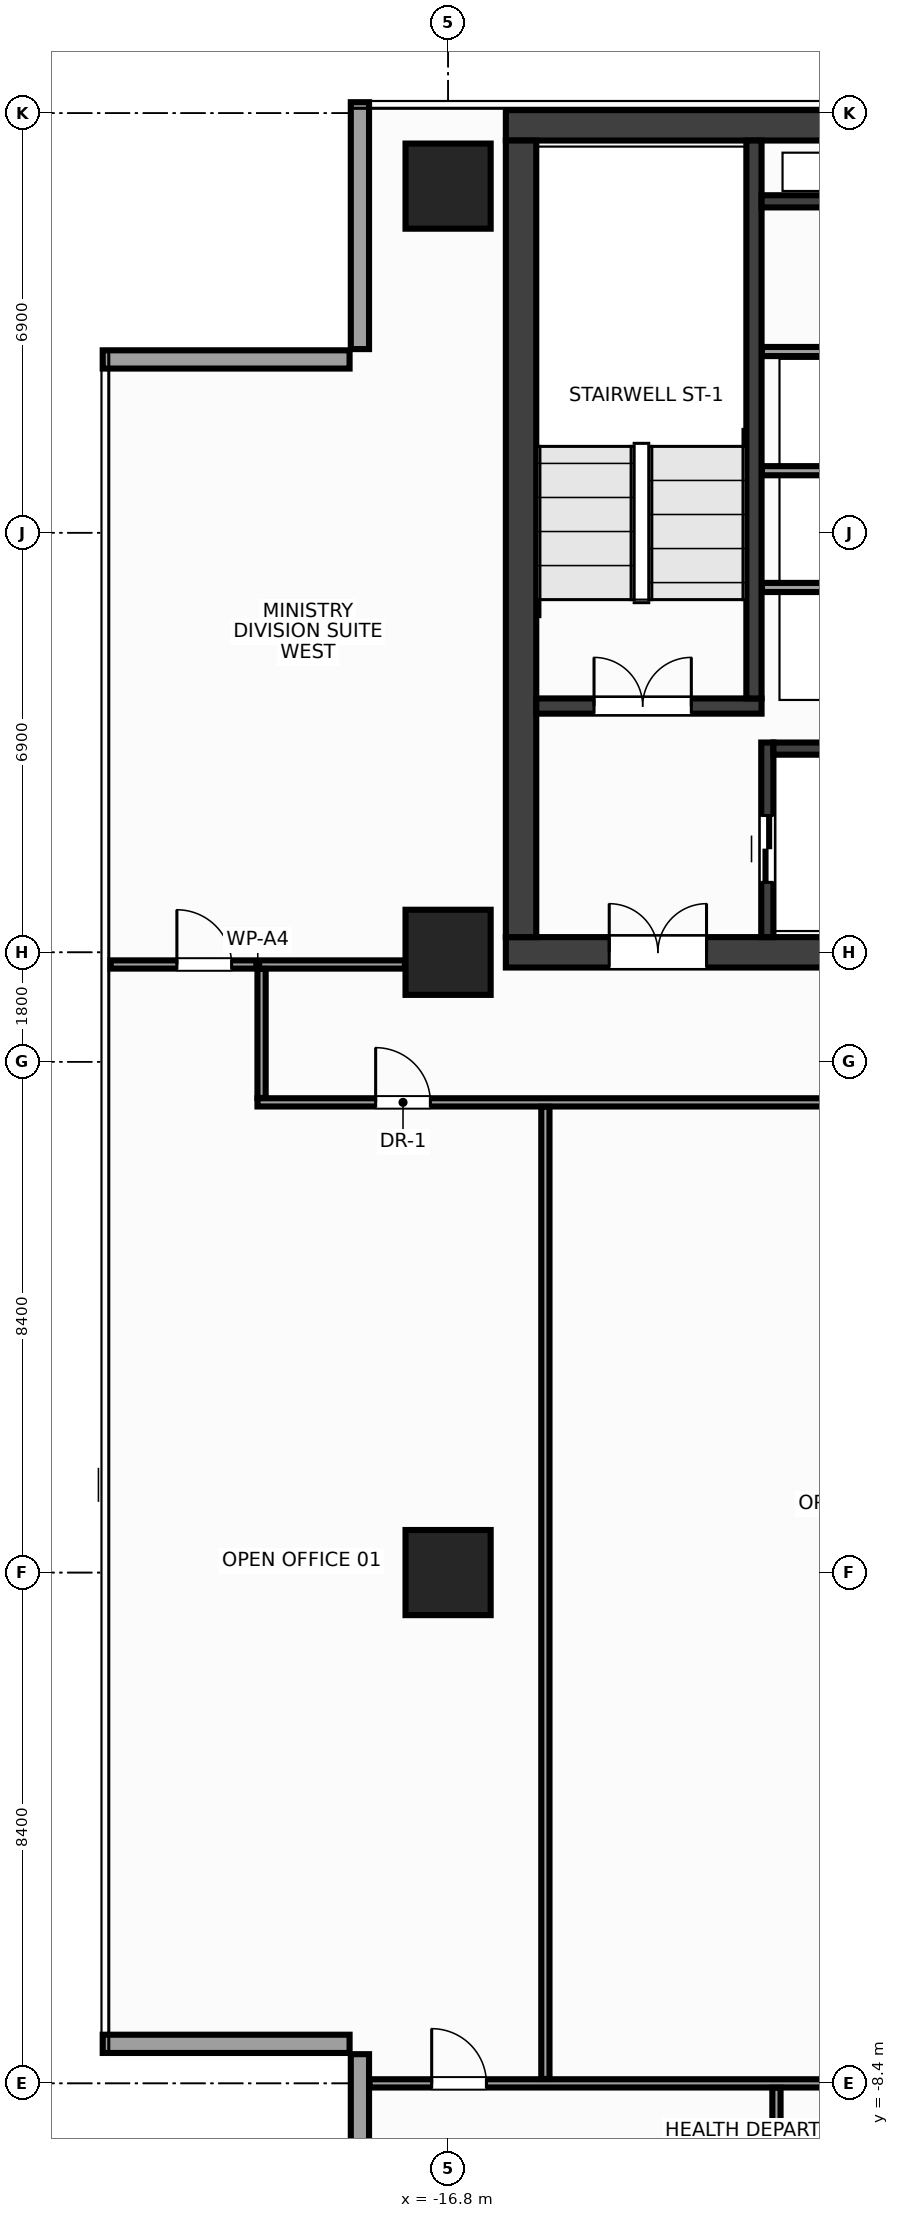
"""IFC4 building model, lengths in metres.
Left out: names, types, materials, properties, quantities, classifications, styles, units other than length and angle.
Written with IfcOpenShell. Run it as: python <this file> out.ifc"""

import sys

from ifc_helpers import new_model, si_unit, direction, frame, frame_2d, origin, origin_2d, place, context, subcontext, project, spatial, rectangle, extrude, source, transform, mapped, element, fill, save


model = new_model("IFC4")
c1 = context("Model", 3, precision=1e-05, world=origin(), true_north=direction((0.0, 1.0)))
c2 = subcontext(c1, "Body", "Model", "MODEL_VIEW")
j1 = project(units=[si_unit("LENGTHUNIT", "METRE"), si_unit("PLANEANGLEUNIT", "RADIAN")], contexts=[c1])
p1 = place(None, origin())
s1 = spatial("IfcSite", under=j1, at=p1, CompositionType="ELEMENT")
p2 = place(p1, origin())
s2 = spatial("IfcBuilding", under=s1, at=p2, CompositionType="ELEMENT")
p3 = place(p2, frame((0.0, 0.0, 232.4)))
s3 = spatial("IfcBuildingStorey", under=s2, at=p3, CompositionType="ELEMENT", Elevation=232.4)
m1 = source(origin(), c2, "Body", "SweptSolid", [
    extrude(rectangle(XDim=31.7, YDim=0.5, at=frame_2d((15.85, 0.0))), origin(), (0.0, 0.0, 1.0), 3.6),
])
p4 = place(p3, frame((-15.85, 23.8, 0.0), z_axis=(0.0, 0.0, 1.0), x_axis=(1.0, 0.0, 0.0)))
e1 = element("IfcWall", 1, at=p4, inside=s3, PredefinedType="SHEAR", context=c2, shape_type="MappedRepresentation", body=[
    mapped(m1, transform((0.0, 0.0, 0.0), x_axis=(1.0, 0.0, 0.0), y_axis=(0.0, 1.0, 0.0), z_axis=(0.0, 0.0, 1.0), scale=1.0)),
])
p5 = place(p3, frame((-15.85, 10.2, 0.0), z_axis=(0.0, 0.0, 1.0), x_axis=(1.0, 0.0, 0.0)))
e2 = element("IfcWall", 2, at=p5, inside=s3, PredefinedType="SHEAR", context=c2, shape_type="MappedRepresentation", body=[
    mapped(m1, transform((0.0, 0.0, 0.0), x_axis=(1.0, 0.0, 0.0), y_axis=(0.0, 1.0, 0.0), z_axis=(0.0, 0.0, 1.0), scale=1.0)),
])
p6 = place(p5, frame((1.7, 0.0, 0.0)))
e3 = element("IfcOpeningElement", 3, at=p6, cuts=e2, PredefinedType="OPENING", context=c2, shape_type="SweptSolid", body=[
    extrude(rectangle(XDim=1.6, YDim=2.15, at=frame_2d((0.8, 1.075))), frame((0.0, 0.262, 0.0), z_axis=(0.0, -1.0, 0.0), x_axis=(1.0, 0.0, 0.0)), (0.0, 0.0, 1.0), 0.524),
])
p7 = place(p5, frame((28.4, 0.0, 0.0)))
e4 = element("IfcOpeningElement", 4, at=p7, cuts=e2, PredefinedType="OPENING", context=c2, shape_type="SweptSolid", body=[
    extrude(rectangle(XDim=1.6, YDim=2.15, at=frame_2d((0.8, 1.075))), frame((0.0, 0.262, 0.0), z_axis=(0.0, -1.0, 0.0), x_axis=(1.0, 0.0, 0.0)), (0.0, 0.0, 1.0), 0.524),
])
p8 = place(p5, frame((15.1, 0.0, 0.0)))
e5 = element("IfcOpeningElement", 5, at=p8, cuts=e2, PredefinedType="OPENING", context=c2, shape_type="SweptSolid", body=[
    extrude(rectangle(XDim=1.5, YDim=2.2, at=frame_2d((0.75, 1.1))), frame((0.0, 0.262, 0.0), z_axis=(0.0, -1.0, 0.0), x_axis=(1.0, 0.0, 0.0)), (0.0, 0.0, 1.0), 0.524),
])
m2 = source(origin(), c2, "Body", "SweptSolid", [
    extrude(rectangle(XDim=13.1, YDim=0.5, at=frame_2d((6.55, 0.0))), origin(), (0.0, 0.0, 1.0), 3.6),
])
p9 = place(p3, frame((-15.6, 10.45, 0.0), z_axis=(0.0, 0.0, 1.0), x_axis=(0.0, 1.0, 0.0)))
e6 = element("IfcWall", 6, at=p9, inside=s3, PredefinedType="SHEAR", context=c2, shape_type="MappedRepresentation", body=[
    mapped(m2, transform((0.0, 0.0, 0.0), x_axis=(1.0, 0.0, 0.0), y_axis=(0.0, 1.0, 0.0), z_axis=(0.0, 0.0, 1.0), scale=1.0)),
])
m3 = source(origin(), c2, "Body", "SweptSolid", [
    extrude(rectangle(XDim=3.705, YDim=0.25, at=frame_2d((1.853, 0.0))), origin(), (0.0, 0.0, 1.0), 3.6),
])
p10 = place(p3, frame((-15.35, 14.25, 0.0), z_axis=(0.0, 0.0, 1.0), x_axis=(1.0, 0.0, 0.0)))
e7 = element("IfcWall", 7, at=p10, inside=s3, PredefinedType="SHEAR", context=c2, shape_type="MappedRepresentation", body=[
    mapped(m3, transform((0.0, 0.0, 0.0), x_axis=(1.0, 0.0, 0.0), y_axis=(0.0, 1.0, 0.0), z_axis=(0.0, 0.0, 1.0), scale=1.0)),
])
p11 = place(p10, frame((0.95, 0.0, 0.0)))
e8 = element("IfcOpeningElement", 8, at=p11, cuts=e7, PredefinedType="OPENING", context=c2, shape_type="SweptSolid", body=[
    extrude(rectangle(XDim=1.6, YDim=2.15, at=frame_2d((0.8, 1.075))), frame((0.0, 0.137, 0.0), z_axis=(0.0, -1.0, 0.0), x_axis=(1.0, 0.0, 0.0)), (0.0, 0.0, 1.0), 0.274),
])
m4 = source(origin(), c2, "Body", "SweptSolid", [
    extrude(rectangle(XDim=9.175, YDim=0.25, at=frame_2d((4.587, 0.0))), origin(), (0.0, 0.0, 1.0), 3.6),
])
p12 = place(p3, frame((-11.77, 14.375, 0.0), z_axis=(0.0, 0.0, 1.0), x_axis=(0.0, 1.0, 0.0)))
e9 = element("IfcWall", 9, at=p12, inside=s3, PredefinedType="SHEAR", context=c2, shape_type="MappedRepresentation", body=[
    mapped(m4, transform((0.0, 0.0, 0.0), x_axis=(1.0, 0.0, 0.0), y_axis=(0.0, 1.0, 0.0), z_axis=(0.0, 0.0, 1.0), scale=1.0)),
])
m5 = source(origin(), c2, "Body", "SweptSolid", [
    extrude(rectangle(XDim=3.2, YDim=0.2, at=frame_2d((1.6, 0.0))), origin(), (0.0, 0.0, 1.0), 3.6),
])
p13 = place(p3, frame((-11.55, 10.45, 0.0), z_axis=(0.0, 0.0, 1.0), x_axis=(0.0, 1.0, 0.0)))
e10 = element("IfcWall", 10, at=p13, inside=s3, PredefinedType="SHEAR", context=c2, shape_type="MappedRepresentation", body=[
    mapped(m5, transform((0.0, 0.0, 0.0), x_axis=(1.0, 0.0, 0.0), y_axis=(0.0, 1.0, 0.0), z_axis=(0.0, 0.0, 1.0), scale=1.0)),
])
p14 = place(p13, frame((0.9, 0.0, 0.0)))
e11 = element("IfcOpeningElement", 11, at=p14, cuts=e10, PredefinedType="OPENING", context=c2, shape_type="SweptSolid", body=[
    extrude(rectangle(XDim=1.1, YDim=2.15, at=frame_2d((0.55, 1.075))), frame((0.0, 0.112, 0.0), z_axis=(0.0, -1.0, 0.0), x_axis=(1.0, 0.0, 0.0)), (0.0, 0.0, 1.0), 0.224),
])
m6 = source(origin(), c2, "Body", "SweptSolid", [
    extrude(rectangle(XDim=2.825, YDim=0.2, at=frame_2d((1.413, 0.0))), origin(), (0.0, 0.0, 1.0), 3.6),
])
p15 = place(p3, frame((-11.45, 13.55, 0.0), z_axis=(0.0, 0.0, 1.0), x_axis=(1.0, 0.0, 0.0)))
e12 = element("IfcWall", 12, at=p15, inside=s3, PredefinedType="SHEAR", context=c2, shape_type="MappedRepresentation", body=[
    mapped(m6, transform((0.0, 0.0, 0.0), x_axis=(1.0, 0.0, 0.0), y_axis=(0.0, 1.0, 0.0), z_axis=(0.0, 0.0, 1.0), scale=1.0)),
])
m7 = source(origin(), c2, "Body", "SweptSolid", [
    extrude(rectangle(XDim=3.02, YDim=0.2, at=frame_2d((1.51, 0.0))), origin(), (0.0, 0.0, 1.0), 3.6),
])
p16 = place(p3, frame((-11.645, 22.55, 0.0), z_axis=(0.0, 0.0, 1.0), x_axis=(1.0, 0.0, 0.0)))
e13 = element("IfcWall", 13, at=p16, inside=s3, PredefinedType="SHEAR", context=c2, shape_type="MappedRepresentation", body=[
    mapped(m7, transform((0.0, 0.0, 0.0), x_axis=(1.0, 0.0, 0.0), y_axis=(0.0, 1.0, 0.0), z_axis=(0.0, 0.0, 1.0), scale=1.0)),
])
m8 = source(origin(), c2, "Body", "SweptSolid", [
    extrude(rectangle(XDim=1.4, YDim=1.4, at=origin_2d()), origin(), (0.0, 0.0, 1.0), 3.6),
])
for number, where, z_axis, x_axis in (
    (14, (-16.8, 0.0, 0.0), (0.0, 0.0, 1.0), (1.0, 0.0, 0.0)),
    (15, (-16.8, 10.2, 0.0), (0.0, 0.0, 1.0), (1.0, 0.0, 0.0)),
    (16, (-16.8, 22.8, 0.0), (0.0, 0.0, 1.0), (1.0, 0.0, 0.0)),
):
    element("IfcColumn", number, at=place(p3, frame(where, z_axis=z_axis, x_axis=x_axis)), inside=s3, PredefinedType="COLUMN", context=c2, shape_type="MappedRepresentation", body=[
        mapped(m8, transform((0.0, 0.0, 0.0), x_axis=(1.0, 0.0, 0.0), y_axis=(0.0, 1.0, 0.0), z_axis=(0.0, 0.0, 1.0), scale=1.0)),
    ])
m9 = source(origin(), c2, "Body", "SweptSolid", [
    extrude(rectangle(XDim=4.06, YDim=0.3, at=frame_2d((2.03, 0.0))), origin(), (0.0, 0.0, 1.0), 2.75),
])
p17 = place(p3, frame((-18.25, 24.18, 0.0), z_axis=(0.0, 0.0, 1.0), x_axis=(0.0, -1.0, 0.0)))
e17 = element("IfcWall", 17, at=p17, inside=s3, PredefinedType="STANDARD", context=c2, shape_type="MappedRepresentation", body=[
    mapped(m9, transform((0.0, 0.0, 0.0), x_axis=(1.0, 0.0, 0.0), y_axis=(0.0, 1.0, 0.0), z_axis=(0.0, 0.0, 1.0), scale=1.0)),
])
m10 = source(origin(), c2, "Body", "SweptSolid", [
    extrude(rectangle(XDim=4.06, YDim=0.3, at=frame_2d((2.03, 0.0))), origin(), (0.0, 0.0, 1.0), 2.75),
])
for number, where, z_axis, x_axis in (
    (18, (-18.42, 19.95, 0.0), (0.0, 0.0, 1.0), (-1.0, 0.0, 0.0)),
    (19, (-22.48, -7.75, 0.0), (0.0, 0.0, 1.0), (1.0, 0.0, 0.0)),
    (20, (-18.25, -7.92, 0.0), (0.0, 0.0, 1.0), (0.0, -1.0, 0.0)),
):
    element("IfcWall", number, at=place(p3, frame(where, z_axis=z_axis, x_axis=x_axis)), inside=s3, PredefinedType="STANDARD", context=c2, shape_type="MappedRepresentation", body=[
        mapped(m10, transform((0.0, 0.0, 0.0), x_axis=(1.0, 0.0, 0.0), y_axis=(0.0, 1.0, 0.0), z_axis=(0.0, 0.0, 1.0), scale=1.0)),
    ])
m11 = source(origin(), c2, "Body", "SweptSolid", [
    extrude(rectangle(XDim=3.01, YDim=0.15, at=frame_2d((1.505, 0.0))), origin(), (0.0, 0.0, 1.0), 3.37),
])
for number, where, z_axis, x_axis in (
    (21, (-11.64, 16.2, 0.0), (0.0, 0.0, 1.0), (1.0, 0.0, 0.0)),
    (22, (-11.64, 18.12, 0.0), (0.0, 0.0, 1.0), (1.0, 0.0, 0.0)),
    (23, (-11.64, 20.08, 0.0), (0.0, 0.0, 1.0), (1.0, 0.0, 0.0)),
):
    element("IfcWall", number, at=place(p3, frame(where, z_axis=z_axis, x_axis=x_axis)), inside=s3, PredefinedType="PARTITIONING", context=c2, shape_type="MappedRepresentation", body=[
        mapped(m11, transform((0.0, 0.0, 0.0), x_axis=(1.0, 0.0, 0.0), y_axis=(0.0, 1.0, 0.0), z_axis=(0.0, 0.0, 1.0), scale=1.0)),
    ])
m12 = source(origin(), c2, "Body", "SweptSolid", [
    extrude(rectangle(XDim=4.84, YDim=0.135, at=frame_2d((2.42, 0.0))), origin(), (0.0, 0.0, 1.0), 3.37),
])
p18 = place(p3, frame((-22.35, 10.0, 0.0), z_axis=(0.0, 0.0, 1.0), x_axis=(1.0, 0.0, 0.0)))
e24 = element("IfcWall", 24, at=p18, inside=s3, PredefinedType="PARTITIONING", context=c2, shape_type="MappedRepresentation", body=[
    mapped(m12, transform((0.0, 0.0, 0.0), x_axis=(1.0, 0.0, 0.0), y_axis=(0.0, 1.0, 0.0), z_axis=(0.0, 0.0, 1.0), scale=1.0)),
])
p19 = place(p18, frame((1.09, 0.0, 0.0)))
e25 = element("IfcOpeningElement", 25, at=p19, cuts=e24, PredefinedType="OPENING", context=c2, shape_type="SweptSolid", body=[
    extrude(rectangle(XDim=0.9, YDim=2.15, at=frame_2d((0.45, 1.075))), frame((0.0, 0.08, 0.0), z_axis=(0.0, -1.0, 0.0), x_axis=(1.0, 0.0, 0.0)), (0.0, 0.0, 1.0), 0.159),
])
m13 = source(origin(), c2, "Body", "SweptSolid", [
    extrude(rectangle(XDim=15.6, YDim=0.135, at=frame_2d((7.8, 0.0))), origin(), (0.0, 0.0, 1.0), 2.755),
])
p20 = place(p3, frame((-19.935, 7.732, 0.0), z_axis=(0.0, 0.0, 1.0), x_axis=(1.0, 0.0, 0.0)))
e26 = element("IfcWall", 26, at=p20, inside=s3, PredefinedType="PARTITIONING", context=c2, shape_type="MappedRepresentation", body=[
    mapped(m13, transform((0.0, 0.0, 0.0), x_axis=(1.0, 0.0, 0.0), y_axis=(0.0, 1.0, 0.0), z_axis=(0.0, 0.0, 1.0), scale=1.0)),
])
p21 = place(p20, frame((1.944, 0.0, 0.0)))
e27 = element("IfcOpeningElement", 27, at=p21, cuts=e26, PredefinedType="OPENING", context=c2, shape_type="SweptSolid", body=[
    extrude(rectangle(XDim=0.9, YDim=2.15, at=frame_2d((0.45, 1.075))), frame((0.0, 0.08, 0.0), z_axis=(0.0, -1.0, 0.0), x_axis=(1.0, 0.0, 0.0)), (0.0, 0.0, 1.0), 0.159),
])
p22 = place(p20, frame((9.691, 0.0, 0.0)))
e28 = element("IfcOpeningElement", 28, at=p22, cuts=e26, PredefinedType="OPENING", context=c2, shape_type="SweptSolid", body=[
    extrude(rectangle(XDim=0.9, YDim=2.15, at=frame_2d((0.45, 1.075))), frame((0.0, 0.08, 0.0), z_axis=(0.0, -1.0, 0.0), x_axis=(1.0, 0.0, 0.0)), (0.0, 0.0, 1.0), 0.159),
])
m14 = source(origin(), c2, "Body", "SweptSolid", [
    extrude(rectangle(XDim=2.123, YDim=0.135, at=frame_2d((1.061, 0.0))), origin(), (0.0, 0.0, 1.0), 3.37),
])
p23 = place(p3, frame((-19.867, 7.805, 0.0), z_axis=(0.0, 0.0, 1.0), x_axis=(0.0, 1.0, 0.0)))
e29 = element("IfcWall", 29, at=p23, inside=s3, PredefinedType="PARTITIONING", context=c2, shape_type="MappedRepresentation", body=[
    mapped(m14, transform((0.0, 0.0, 0.0), x_axis=(1.0, 0.0, 0.0), y_axis=(0.0, 1.0, 0.0), z_axis=(0.0, 0.0, 1.0), scale=1.0)),
])
m15 = source(origin(), c2, "Body", "SweptSolid", [
    extrude(rectangle(XDim=36.184, YDim=0.135, at=frame_2d((18.092, 0.0))), origin(), (0.0, 0.0, 1.0), 2.755),
])
p24 = place(p3, frame((-18.092, -8.4, 0.0), z_axis=(0.0, 0.0, 1.0), x_axis=(1.0, 0.0, 0.0)))
e30 = element("IfcWall", 30, at=p24, inside=s3, PredefinedType="PARTITIONING", context=c2, shape_type="MappedRepresentation", body=[
    mapped(m15, transform((0.0, 0.0, 0.0), x_axis=(1.0, 0.0, 0.0), y_axis=(0.0, 1.0, 0.0), z_axis=(0.0, 0.0, 1.0), scale=1.0)),
])
p25 = place(p24, frame((1.022, 0.0, 0.0)))
e31 = element("IfcOpeningElement", 31, at=p25, cuts=e30, PredefinedType="OPENING", context=c2, shape_type="SweptSolid", body=[
    extrude(rectangle(XDim=0.9, YDim=2.15, at=frame_2d((0.45, 1.075))), frame((0.0, 0.08, 0.0), z_axis=(0.0, -1.0, 0.0), x_axis=(1.0, 0.0, 0.0)), (0.0, 0.0, 1.0), 0.159),
])
p26 = place(p24, frame((9.142, 0.0, 0.0)))
e32 = element("IfcOpeningElement", 32, at=p26, cuts=e30, PredefinedType="OPENING", context=c2, shape_type="SweptSolid", body=[
    extrude(rectangle(XDim=0.9, YDim=2.15, at=frame_2d((0.45, 1.075))), frame((0.0, 0.08, 0.0), z_axis=(0.0, -1.0, 0.0), x_axis=(1.0, 0.0, 0.0)), (0.0, 0.0, 1.0), 0.159),
])
p27 = place(p24, frame((33.862, 0.0, 0.0)))
e33 = element("IfcOpeningElement", 33, at=p27, cuts=e30, PredefinedType="OPENING", context=c2, shape_type="SweptSolid", body=[
    extrude(rectangle(XDim=0.9, YDim=2.15, at=frame_2d((0.45, 1.075))), frame((0.0, 0.08, 0.0), z_axis=(0.0, -1.0, 0.0), x_axis=(1.0, 0.0, 0.0)), (0.0, 0.0, 1.0), 0.159),
])
p28 = place(p24, frame((18.942, 0.0, 0.0)))
e34 = element("IfcOpeningElement", 34, at=p28, cuts=e30, PredefinedType="OPENING", context=c2, shape_type="SweptSolid", body=[
    extrude(rectangle(XDim=0.9, YDim=2.15, at=frame_2d((0.45, 1.075))), frame((0.0, 0.08, 0.0), z_axis=(0.0, -1.0, 0.0), x_axis=(1.0, 0.0, 0.0)), (0.0, 0.0, 1.0), 0.159),
])
p29 = place(p24, frame((25.542, 0.0, 0.0)))
e35 = element("IfcOpeningElement", 35, at=p29, cuts=e30, PredefinedType="OPENING", context=c2, shape_type="SweptSolid", body=[
    extrude(rectangle(XDim=0.9, YDim=2.15, at=frame_2d((0.45, 1.075))), frame((0.0, 0.08, 0.0), z_axis=(0.0, -1.0, 0.0), x_axis=(1.0, 0.0, 0.0)), (0.0, 0.0, 1.0), 0.159),
])
m16 = source(origin(), c2, "Body", "SweptSolid", [
    extrude(rectangle(XDim=15.987, YDim=0.135, at=frame_2d((7.994, 0.0))), origin(), (0.0, 0.0, 1.0), 2.655),
])
p30 = place(p3, frame((-15.2, -8.327, 0.0), z_axis=(0.0, 0.0, 1.0), x_axis=(0.0, 1.0, 0.0)))
e36 = element("IfcWall", 36, at=p30, inside=s3, PredefinedType="PARTITIONING", context=c2, shape_type="MappedRepresentation", body=[
    mapped(m16, transform((0.0, 0.0, 0.0), x_axis=(1.0, 0.0, 0.0), y_axis=(0.0, 1.0, 0.0), z_axis=(0.0, 0.0, 1.0), scale=1.0)),
])
m17 = source(origin(), c2, "Body", "SweptSolid", [
    extrude(rectangle(XDim=3.378, YDim=0.135, at=frame_2d((1.689, 0.0))), origin(), (0.0, 0.0, 1.0), 2.905),
])
p31 = place(p3, frame((-11.4, -11.85, 0.0), z_axis=(0.0, 0.0, 1.0), x_axis=(0.0, 1.0, 0.0)))
e37 = element("IfcWall", 37, at=p31, inside=s3, PredefinedType="PARTITIONING", context=c2, shape_type="MappedRepresentation", body=[
    mapped(m17, transform((0.0, 0.0, 0.0), x_axis=(1.0, 0.0, 0.0), y_axis=(0.0, 1.0, 0.0), z_axis=(0.0, 0.0, 1.0), scale=1.0)),
])
m18 = source(origin(), c2, "Body", "SweptSolid", [
    extrude(rectangle(XDim=1.6, YDim=2.15, at=frame_2d((0.8, 1.075))), frame((0.0, 0.025, 0.0), z_axis=(0.0, -1.0, 0.0), x_axis=(1.0, 0.0, 0.0)), (0.0, 0.0, 1.0), 0.05),
])
p32 = place(p11, origin())
e38 = element("IfcDoor", 38, at=p32, inside=s3, OperationType="DOUBLE_DOOR_SINGLE_SWING", PredefinedType="DOOR", context=c2, shape_type="MappedRepresentation", body=[
    mapped(m18, transform((0.0, 0.0, 0.0), x_axis=(1.0, 0.0, 0.0), y_axis=(0.0, 1.0, 0.0), z_axis=(0.0, 0.0, 1.0), scale=1.0)),
])
fill(e8, e38)
p33 = place(p6, origin())
e39 = element("IfcDoor", 39, at=p33, inside=s3, OperationType="DOUBLE_DOOR_SINGLE_SWING", PredefinedType="DOOR", context=c2, shape_type="MappedRepresentation", body=[
    mapped(m18, transform((0.0, 0.0, 0.0), x_axis=(1.0, 0.0, 0.0), y_axis=(0.0, 1.0, 0.0), z_axis=(0.0, 0.0, 1.0), scale=1.0)),
])
fill(e3, e39)
m19 = source(origin(), c2, "Body", "SweptSolid", [
    extrude(rectangle(XDim=1.1, YDim=2.15, at=frame_2d((0.55, 1.075))), frame((0.0, 0.025, 0.0), z_axis=(0.0, -1.0, 0.0), x_axis=(1.0, 0.0, 0.0)), (0.0, 0.0, 1.0), 0.05),
])
p34 = place(p14, origin())
e40 = element("IfcDoor", 40, at=p34, inside=s3, OperationType="DOUBLE_DOOR_SLIDING", PredefinedType="DOOR", context=c2, shape_type="MappedRepresentation", body=[
    mapped(m19, transform((0.0, 0.0, 0.0), x_axis=(1.0, 0.0, 0.0), y_axis=(0.0, 1.0, 0.0), z_axis=(0.0, 0.0, 1.0), scale=1.0)),
])
fill(e11, e40)
m20 = source(origin(), c2, "Body", "SweptSolid", [
    extrude(rectangle(XDim=0.9, YDim=2.15, at=frame_2d((0.45, 1.075))), frame((0.0, 0.025, 0.0), z_axis=(0.0, -1.0, 0.0), x_axis=(1.0, 0.0, 0.0)), (0.0, 0.0, 1.0), 0.05),
])
p35 = place(p21, origin())
e41 = element("IfcDoor", 41, at=p35, inside=s3, OperationType="SINGLE_SWING_LEFT", PredefinedType="DOOR", context=c2, shape_type="MappedRepresentation", body=[
    mapped(m20, transform((0.0, 0.0, 0.0), x_axis=(1.0, 0.0, 0.0), y_axis=(0.0, 1.0, 0.0), z_axis=(0.0, 0.0, 1.0), scale=1.0)),
])
fill(e27, e41)
p36 = place(p19, origin())
e42 = element("IfcDoor", 42, at=p36, inside=s3, OperationType="SINGLE_SWING_LEFT", PredefinedType="DOOR", context=c2, shape_type="MappedRepresentation", body=[
    mapped(m20, transform((0.0, 0.0, 0.0), x_axis=(1.0, 0.0, 0.0), y_axis=(0.0, 1.0, 0.0), z_axis=(0.0, 0.0, 1.0), scale=1.0)),
])
fill(e25, e42)
p37 = place(p25, origin())
e43 = element("IfcDoor", 43, at=p37, inside=s3, OperationType="SINGLE_SWING_LEFT", PredefinedType="DOOR", context=c2, shape_type="MappedRepresentation", body=[
    mapped(m20, transform((0.0, 0.0, 0.0), x_axis=(1.0, 0.0, 0.0), y_axis=(0.0, 1.0, 0.0), z_axis=(0.0, 0.0, 1.0), scale=1.0)),
])
fill(e31, e43)
save(model, sys.argv[1])
